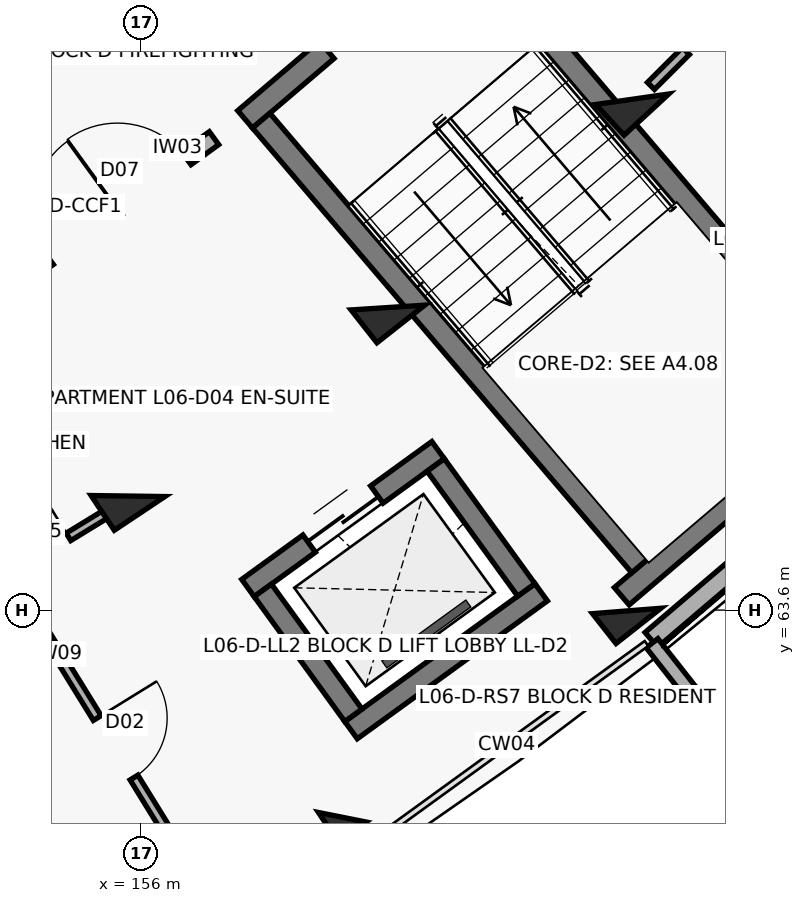
"""IFC4 building model, lengths in metres.
Left out: names, types, materials, properties, quantities, classifications, styles, units other than length and angle.
Written with IfcOpenShell. Run it as: python <this file> out.ifc"""

import sys

from ifc_helpers import new_model, si_unit, direction, frame, frame_2d, origin, origin_2d, place, context, subcontext, project, spatial, rectangle, extrude, element, fill, save


model = new_model("IFC4")
c1 = context("Model", 3, precision=1e-05, world=origin(), true_north=direction((0.0, 1.0)))
c2 = subcontext(c1, "Body", "Model", "MODEL_VIEW")
j1 = project(units=[si_unit("LENGTHUNIT", "METRE"), si_unit("PLANEANGLEUNIT", "RADIAN")], contexts=[c1])
p1 = place(None, origin())
s1 = spatial("IfcSite", under=j1, at=p1, CompositionType="ELEMENT")
p2 = place(p1, origin())
s2 = spatial("IfcBuilding", under=s1, at=p2, CompositionType="ELEMENT")
p3 = place(p2, frame((0.0, 0.0, 20.5)))
s3 = spatial("IfcBuildingStorey", under=s2, at=p3, CompositionType="ELEMENT", Elevation=20.5)
p4 = place(p3, frame((155.831, 65.101, 0.0), z_axis=(0.0, 0.0, 1.0), x_axis=(0.554844427448, -0.83195412213, 0.0)))
e1 = element("IfcColumn", 1, at=p4, inside=s3, PredefinedType="COLUMN", context=c2, shape_type="SweptSolid", body=[
    extrude(rectangle(XDim=0.55, YDim=0.8, at=origin_2d()), origin(), (0.0, 0.0, 1.0), 3.1),
])
p5 = place(p3, frame((158.649, 60.875, 0.0), z_axis=(0.0, 0.0, 1.0), x_axis=(0.554844427448, -0.83195412213, 0.0)))
e2 = element("IfcColumn", 2, at=p5, inside=s3, PredefinedType="COLUMN", context=c2, shape_type="SweptSolid", body=[
    extrude(rectangle(XDim=0.45, YDim=0.45, at=origin_2d()), origin(), (0.0, 0.0, 1.0), 3.1),
])
p6 = place(p3, frame((159.25, 67.581, 0.0), z_axis=(0.0, 0.0, 1.0), x_axis=(0.618408395358, -0.785856893175, 0.0)))
e3 = element("IfcColumn", 3, at=p6, inside=s3, PredefinedType="COLUMN", context=c2, shape_type="SweptSolid", body=[
    extrude(rectangle(XDim=0.55, YDim=0.8, at=origin_2d()), origin(), (0.0, 0.0, 1.0), 3.1),
])
p7 = place(p3, frame((162.392, 63.589, 0.0), z_axis=(0.0, 0.0, 1.0), x_axis=(0.618408395358, -0.785856893175, 0.0)))
e4 = element("IfcColumn", 4, at=p7, inside=s3, PredefinedType="COLUMN", context=c2, shape_type="SweptSolid", body=[
    extrude(rectangle(XDim=0.5, YDim=0.75, at=origin_2d()), origin(), (0.0, 0.0, 1.0), 3.1),
])
p8 = place(p3, frame((162.465, 70.322, 0.0), z_axis=(0.0, 0.0, 1.0), x_axis=(0.678159669868, -0.73491459515, 0.0)))
e5 = element("IfcColumn", 5, at=p8, inside=s3, PredefinedType="COLUMN", context=c2, shape_type="SweptSolid", body=[
    extrude(rectangle(XDim=0.55, YDim=0.8, at=origin_2d()), origin(), (0.0, 0.0, 1.0), 3.1),
])
p9 = place(p3, frame((162.716, 63.209, 0.0), z_axis=(0.0, 0.0, 1.0), x_axis=(0.760968923704, 0.64878833001, 0.0)))
e6 = element("IfcWall", 6, at=p9, inside=s3, PredefinedType="SOLIDWALL", context=c2, shape_type="SweptSolid", body=[
    extrude(rectangle(XDim=4.623, YDim=0.255, at=frame_2d((2.311, 0.0))), origin(), (0.0, 0.0, 1.0), 2.25),
])
p10 = place(p3, frame((162.726, 63.164, 0.0), z_axis=(0.0, 0.0, 1.0), x_axis=(0.618456270212, -0.785819217019, 0.0)))
e7 = element("IfcWall", 7, at=p10, inside=s3, PredefinedType="PARAPET", context=c2, shape_type="SweptSolid", body=[
    extrude(rectangle(XDim=0.9, YDim=0.195, at=frame_2d((0.45, 0.0))), origin(), (0.0, 0.0, 1.0), 2.25),
])
p11 = place(p3, frame((157.372, 70.058, 0.0), z_axis=(0.0, 0.0, 1.0), x_axis=(0.760990583254, 0.648762924495, 0.0)))
e8 = element("IfcWall", 8, at=p11, inside=s3, PredefinedType="SHEAR", context=c2, shape_type="SweptSolid", body=[
    extrude(rectangle(XDim=3.87, YDim=0.3, at=frame_2d((1.935, 0.0))), origin(), (0.0, 0.0, 1.0), 3.1),
])
p12 = place(p11, frame((1.41, 0.0, 0.0)))
e9 = element("IfcOpeningElement", 9, at=p12, cuts=e8, PredefinedType="OPENING", context=c2, shape_type="SweptSolid", body=[
    extrude(rectangle(XDim=1.05, YDim=2.15, at=frame_2d((0.525, 1.075))), frame((0.0, 0.16, 0.0), z_axis=(0.0, -1.0, 0.0), x_axis=(1.0, 0.0, 0.0)), (0.0, 0.0, 1.0), 0.32),
])
p13 = place(p3, frame((162.327, 63.783, 0.0), z_axis=(0.0, 0.0, 1.0), x_axis=(0.760969560012, 0.648787583678, 0.0)))
e10 = element("IfcWall", 10, at=p13, inside=s3, PredefinedType="SHEAR", context=c2, shape_type="SweptSolid", body=[
    extrude(rectangle(XDim=4.47, YDim=0.3, at=frame_2d((2.235, 0.0))), origin(), (0.0, 0.0, 1.0), 3.1),
])
p14 = place(p3, frame((157.583, 70.041, 0.0), z_axis=(0.0, 0.0, 1.0), x_axis=(0.648762810187, -0.760990680704, 0.0)))
e11 = element("IfcWall", 11, at=p14, inside=s3, PredefinedType="SHEAR", context=c2, shape_type="SweptSolid", body=[
    extrude(rectangle(XDim=7.69, YDim=0.3, at=frame_2d((3.845, 0.0))), origin(), (0.0, 0.0, 1.0), 3.1),
])
p15 = place(p3, frame((160.3, 72.357, 0.0), z_axis=(0.0, 0.0, 1.0), x_axis=(0.648781194888, -0.760975006922, 0.0)))
e12 = element("IfcWall", 12, at=p15, inside=s3, PredefinedType="SHEAR", context=c2, shape_type="SweptSolid", body=[
    extrude(rectangle(XDim=7.69, YDim=0.3, at=frame_2d((3.845, 0.0))), origin(), (0.0, 0.0, 1.0), 3.1),
])
p16 = place(p3, frame((157.409, 63.89, 0.0), z_axis=(0.0, 0.0, 1.0), x_axis=(0.809510936031, 0.587104798521, 0.0)))
e13 = element("IfcWall", 13, at=p16, inside=s3, PredefinedType="SHEAR", context=c2, shape_type="SweptSolid", body=[
    extrude(rectangle(XDim=3.09, YDim=0.28, at=frame_2d((1.545, 0.0))), origin(), (0.0, 0.0, 1.0), 3.1),
])
p17 = place(p16, frame((0.995, 0.0, 0.0)))
e14 = element("IfcOpeningElement", 14, at=p17, cuts=e13, PredefinedType="OPENING", context=c2, shape_type="SweptSolid", body=[
    extrude(rectangle(XDim=1.1, YDim=2.15, at=frame_2d((0.55, 1.075))), frame((0.0, 0.15, 0.0), z_axis=(0.0, -1.0, 0.0), x_axis=(1.0, 0.0, 0.0)), (0.0, 0.0, 1.0), 0.3),
])
p18 = place(p3, frame((158.765, 62.021, 0.0), z_axis=(0.0, 0.0, 1.0), x_axis=(0.809548485838, 0.587053020669, 0.0)))
e15 = element("IfcWall", 15, at=p18, inside=s3, PredefinedType="SHEAR", context=c2, shape_type="SweptSolid", body=[
    extrude(rectangle(XDim=3.09, YDim=0.28, at=frame_2d((1.545, 0.0))), origin(), (0.0, 0.0, 1.0), 3.1),
])
p19 = place(p3, frame((157.604, 63.859, 0.0), z_axis=(0.0, 0.0, 1.0), x_axis=(0.587127188998, -0.809494696671, 0.0)))
e16 = element("IfcWall", 16, at=p19, inside=s3, PredefinedType="SHEAR", context=c2, shape_type="SweptSolid", body=[
    extrude(rectangle(XDim=2.03, YDim=0.28, at=frame_2d((1.015, 0.0))), origin(), (0.0, 0.0, 1.0), 3.1),
])
p20 = place(p3, frame((159.879, 65.509, 0.0), z_axis=(0.0, 0.0, 1.0), x_axis=(0.58704837408, -0.809551855344, 0.0)))
e17 = element("IfcWall", 17, at=p20, inside=s3, PredefinedType="SHEAR", context=c2, shape_type="SweptSolid", body=[
    extrude(rectangle(XDim=2.03, YDim=0.28, at=frame_2d((1.015, 0.0))), origin(), (0.0, 0.0, 1.0), 3.1),
])
p21 = place(p3, frame((152.507, 63.01, 0.0), z_axis=(0.0, 0.0, 1.0), x_axis=(0.853110474662, 0.521730311581, 0.0)))
e18 = element("IfcWall", 18, at=p21, inside=s3, PredefinedType="PARTITIONING", context=c2, shape_type="SweptSolid", body=[
    extrude(rectangle(XDim=3.628, YDim=0.115, at=frame_2d((1.814, 0.0))), origin(), (0.0, 0.0, 1.0), 2.08),
])
p22 = place(p21, frame((0.65, 0.0, 0.0)))
e19 = element("IfcOpeningElement", 19, at=p22, cuts=e18, PredefinedType="OPENING", context=c2, shape_type="SweptSolid", body=[
    extrude(rectangle(XDim=0.9, YDim=2.1, at=frame_2d((0.45, 1.05))), frame((0.0, 0.067, 0.0), z_axis=(0.0, -1.0, 0.0), x_axis=(1.0, 0.0, 0.0)), (0.0, 0.0, 1.0), 0.135),
])
p23 = place(p21, frame((2.098, 0.0, 0.0)))
e20 = element("IfcOpeningElement", 20, at=p23, cuts=e18, PredefinedType="OPENING", context=c2, shape_type="SweptSolid", body=[
    extrude(rectangle(XDim=0.88, YDim=2.1, at=frame_2d((0.44, 1.05))), frame((0.0, 0.067, 0.0), z_axis=(0.0, -1.0, 0.0), x_axis=(1.0, 0.0, 0.0)), (0.0, 0.0, 1.0), 0.135),
])
p24 = place(p3, frame((154.38, 63.873, 0.0), z_axis=(0.0, 0.0, 1.0), x_axis=(0.525458935368, -0.850818962672, 0.0)))
e21 = element("IfcWall", 21, at=p24, inside=s3, PredefinedType="PARTITIONING", context=c2, shape_type="SweptSolid", body=[
    extrude(rectangle(XDim=4.9, YDim=0.12, at=frame_2d((2.45, 0.0))), origin(), (0.0, 0.0, 1.0), 2.08),
])
p25 = place(p24, frame((1.99, 0.0, 0.0)))
e22 = element("IfcOpeningElement", 22, at=p25, cuts=e21, PredefinedType="OPENING", context=c2, shape_type="SweptSolid", body=[
    extrude(rectangle(XDim=0.92, YDim=2.1, at=frame_2d((0.46, 1.05))), frame((0.0, 0.07, 0.0), z_axis=(0.0, -1.0, 0.0), x_axis=(1.0, 0.0, 0.0)), (0.0, 0.0, 1.0), 0.14),
])
p26 = place(p3, frame((154.423, 67.968, 0.0), z_axis=(0.0, 0.0, 1.0), x_axis=(0.809516127005, 0.587097641043, 0.0)))
e23 = element("IfcWall", 23, at=p26, inside=s3, PredefinedType="SOLIDWALL", context=c2, shape_type="SweptSolid", body=[
    extrude(rectangle(XDim=3.137, YDim=0.21, at=frame_2d((1.569, 0.0))), origin(), (0.0, 0.0, 1.0), 2.08),
])
p27 = place(p26, frame((0.45, 0.0, 0.0)))
e24 = element("IfcOpeningElement", 24, at=p27, cuts=e23, PredefinedType="OPENING", context=c2, shape_type="SweptSolid", body=[
    extrude(rectangle(XDim=1.1, YDim=2.15, at=frame_2d((0.55, 1.075))), frame((0.0, 0.115, 0.0), z_axis=(0.0, -1.0, 0.0), x_axis=(1.0, 0.0, 0.0)), (0.0, 0.0, 1.0), 0.23),
])
p28 = place(p26, frame((1.567, 0.0, 0.0)))
e25 = element("IfcOpeningElement", 25, at=p28, cuts=e23, PredefinedType="OPENING", context=c2, shape_type="SweptSolid", body=[
    extrude(rectangle(XDim=1.12, YDim=2.15, at=frame_2d((0.56, 1.075))), frame((0.0, 0.115, 0.0), z_axis=(0.0, -1.0, 0.0), x_axis=(1.0, 0.0, 0.0)), (0.0, 0.0, 1.0), 0.23),
])
p29 = place(p3, frame((162.711, 70.497, 0.0), z_axis=(0.0, 0.0, 1.0), x_axis=(0.70774573777, 0.706467246706, 0.0)))
e26 = element("IfcWall", 26, at=p29, inside=s3, PredefinedType="PARTITIONING", context=c2, shape_type="SweptSolid", body=[
    extrude(rectangle(XDim=3.628, YDim=0.13, at=frame_2d((1.814, 0.0))), origin(), (0.0, 0.0, 1.0), 2.08),
])
p30 = place(p29, frame((0.65, 0.0, 0.0)))
e27 = element("IfcOpeningElement", 27, at=p30, cuts=e26, PredefinedType="OPENING", context=c2, shape_type="SweptSolid", body=[
    extrude(rectangle(XDim=0.9, YDim=2.1, at=frame_2d((0.45, 1.05))), frame((0.0, 0.075, 0.0), z_axis=(0.0, -1.0, 0.0), x_axis=(1.0, 0.0, 0.0)), (0.0, 0.0, 1.0), 0.15),
])
p31 = place(p29, frame((2.098, 0.0, 0.0)))
e28 = element("IfcOpeningElement", 28, at=p31, cuts=e26, PredefinedType="OPENING", context=c2, shape_type="SweptSolid", body=[
    extrude(rectangle(XDim=0.88, YDim=2.1, at=frame_2d((0.44, 1.05))), frame((0.0, 0.075, 0.0), z_axis=(0.0, -1.0, 0.0), x_axis=(1.0, 0.0, 0.0)), (0.0, 0.0, 1.0), 0.15),
])
p32 = place(p17, origin())
e29 = element("IfcDoor", 29, at=p32, inside=s3, OperationType="DOUBLE_DOOR_SLIDING", PredefinedType="DOOR", context=c2, shape_type="SweptSolid", body=[
    extrude(rectangle(XDim=1.1, YDim=2.15, at=frame_2d((0.55, 1.075))), frame((0.0, 0.025, 0.0), z_axis=(0.0, -1.0, 0.0), x_axis=(1.0, 0.0, 0.0)), (0.0, 0.0, 1.0), 0.05),
])
fill(e14, e29)
p33 = place(p23, origin())
e30 = element("IfcDoor", 30, at=p33, inside=s3, OperationType="SINGLE_SWING_RIGHT", PredefinedType="DOOR", context=c2, shape_type="SweptSolid", body=[
    extrude(rectangle(XDim=0.88, YDim=2.1, at=frame_2d((0.44, 1.05))), frame((0.0, 0.025, 0.0), z_axis=(0.0, -1.0, 0.0), x_axis=(1.0, 0.0, 0.0)), (0.0, 0.0, 1.0), 0.05),
])
fill(e20, e30)
p34 = place(p25, origin())
e31 = element("IfcDoor", 31, at=p34, inside=s3, OperationType="SINGLE_SWING_LEFT", PredefinedType="DOOR", context=c2, shape_type="SweptSolid", body=[
    extrude(rectangle(XDim=0.92, YDim=2.1, at=frame_2d((0.46, 1.05))), frame((0.0, 0.025, 0.0), z_axis=(0.0, -1.0, 0.0), x_axis=(1.0, 0.0, 0.0)), (0.0, 0.0, 1.0), 0.05),
])
fill(e22, e31)
p35 = place(p27, origin())
e32 = element("IfcDoor", 32, at=p35, inside=s3, OperationType="SINGLE_SWING_RIGHT", PredefinedType="DOOR", context=c2, shape_type="SweptSolid", body=[
    extrude(rectangle(XDim=1.1, YDim=2.15, at=frame_2d((0.55, 1.075))), frame((0.0, 0.025, 0.0), z_axis=(0.0, -1.0, 0.0), x_axis=(1.0, 0.0, 0.0)), (0.0, 0.0, 1.0), 0.05),
])
fill(e24, e32)
p36 = place(p28, origin())
e33 = element("IfcDoor", 33, at=p36, inside=s3, OperationType="SINGLE_SWING_LEFT", PredefinedType="DOOR", context=c2, shape_type="SweptSolid", body=[
    extrude(rectangle(XDim=1.12, YDim=2.15, at=frame_2d((0.56, 1.075))), frame((0.0, 0.025, 0.0), z_axis=(0.0, -1.0, 0.0), x_axis=(1.0, 0.0, 0.0)), (0.0, 0.0, 1.0), 0.05),
])
fill(e25, e33)
p37 = place(p30, origin())
e34 = element("IfcDoor", 34, at=p37, inside=s3, OperationType="SINGLE_SWING_RIGHT", PredefinedType="DOOR", context=c2, shape_type="SweptSolid", body=[
    extrude(rectangle(XDim=0.9, YDim=2.1, at=frame_2d((0.45, 1.05))), frame((0.0, 0.025, 0.0), z_axis=(0.0, -1.0, 0.0), x_axis=(1.0, 0.0, 0.0)), (0.0, 0.0, 1.0), 0.05),
])
fill(e27, e34)
save(model, sys.argv[1])
